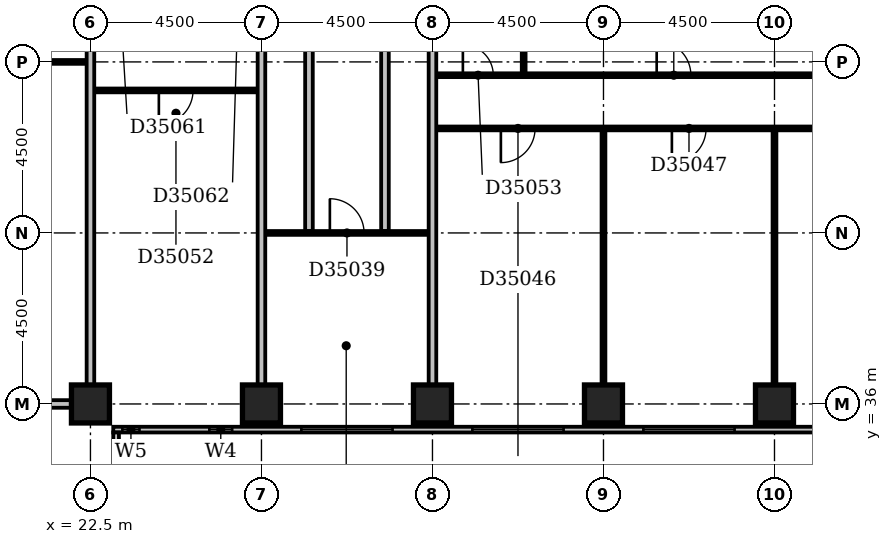
"""IFC4 building model, lengths in metres.
Left out: names, types, materials, properties, quantities, classifications, styles, units other than length and angle.
Written with IfcOpenShell. Run it as: python <this file> out.ifc"""

import sys

from ifc_helpers import new_model, si_unit, direction, frame, frame_2d, origin, origin_2d, place, context, subcontext, project, spatial, rectangle, extrude, element, fill, save


model = new_model("IFC4")
c1 = context("Model", 3, precision=1e-05, world=origin(), true_north=direction((0.0, 1.0)))
c2 = subcontext(c1, "Body", "Model", "MODEL_VIEW")
j1 = project(units=[si_unit("LENGTHUNIT", "METRE"), si_unit("PLANEANGLEUNIT", "RADIAN")], contexts=[c1])
p1 = place(None, origin())
s1 = spatial("IfcSite", under=j1, at=p1, CompositionType="ELEMENT")
p2 = place(p1, origin())
s2 = spatial("IfcBuilding", under=s1, at=p2, CompositionType="ELEMENT")
p3 = place(p2, frame((0.0, 0.0, 141.2)))
s3 = spatial("IfcBuildingStorey", under=s2, at=p3, CompositionType="ELEMENT", Elevation=141.2)
for number, where, z_axis, x_axis in (
    (1, (22.5, 36.0, -0.3), (0.0, 0.0, 1.0), (1.0, 0.0, 0.0)),
    (2, (27.0, 36.0, -0.3), (0.0, 0.0, 1.0), (1.0, 0.0, 0.0)),
    (3, (31.5, 36.0, -0.3), (0.0, 0.0, 1.0), (1.0, 0.0, 0.0)),
    (4, (36.0, 36.0, -0.3), (0.0, 0.0, 1.0), (1.0, 0.0, 0.0)),
    (5, (40.5, 36.0, -0.3), (0.0, 0.0, 1.0), (1.0, 0.0, 0.0)),
):
    element("IfcColumn", number, at=place(p3, frame(where, z_axis=z_axis, x_axis=x_axis)), inside=s3, PredefinedType="COLUMN", context=c2, shape_type="SweptSolid", body=[
        extrude(rectangle(XDim=1.0, YDim=1.0, at=origin_2d()), origin(), (0.0, 0.0, 1.0), 3.6),
    ])
p4 = place(p3, frame((23.175, 17.4, 0.0), z_axis=(0.0, 0.0, 1.0), x_axis=(0.0, 1.0, 0.0)))
e6 = element("IfcWall", 6, at=p4, inside=s3, PredefinedType="STANDARD", context=c2, shape_type="SweptSolid", body=[
    extrude(rectangle(XDim=17.85, YDim=0.15, at=frame_2d((8.925, 0.0))), origin(), (0.0, 0.0, 1.0), 2.7),
])
p5 = place(p4, frame((3.397, 0.0, 0.6)))
e7 = element("IfcOpeningElement", 7, at=p5, cuts=e6, PredefinedType="OPENING", context=c2, shape_type="SweptSolid", body=[
    extrude(rectangle(XDim=0.9, YDim=1.8, at=frame_2d((0.45, 0.9))), frame((0.0, 0.087, 0.0), z_axis=(0.0, -1.0, 0.0), x_axis=(1.0, 0.0, 0.0)), (0.0, 0.0, 1.0), 0.174),
])
p6 = place(p4, frame((6.15, 0.0, 0.6)))
e8 = element("IfcOpeningElement", 8, at=p6, cuts=e6, PredefinedType="OPENING", context=c2, shape_type="SweptSolid", body=[
    extrude(rectangle(XDim=2.4, YDim=1.8, at=frame_2d((1.2, 0.9))), frame((0.0, 0.087, 0.0), z_axis=(0.0, -1.0, 0.0), x_axis=(1.0, 0.0, 0.0)), (0.0, 0.0, 1.0), 0.174),
])
p7 = place(p4, frame((10.65, 0.0, 0.6)))
e9 = element("IfcOpeningElement", 9, at=p7, cuts=e6, PredefinedType="OPENING", context=c2, shape_type="SweptSolid", body=[
    extrude(rectangle(XDim=2.4, YDim=1.8, at=frame_2d((1.2, 0.9))), frame((0.0, 0.087, 0.0), z_axis=(0.0, -1.0, 0.0), x_axis=(1.0, 0.0, 0.0)), (0.0, 0.0, 1.0), 0.174),
])
p8 = place(p4, frame((15.15, 0.0, 0.6)))
e10 = element("IfcOpeningElement", 10, at=p8, cuts=e6, PredefinedType="OPENING", context=c2, shape_type="SweptSolid", body=[
    extrude(rectangle(XDim=2.4, YDim=1.8, at=frame_2d((1.2, 0.9))), frame((0.0, 0.087, 0.0), z_axis=(0.0, -1.0, 0.0), x_axis=(1.0, 0.0, 0.0)), (0.0, 0.0, 1.0), 0.174),
])
p9 = place(p3, frame((23.1, 35.325, 0.0), z_axis=(0.0, 0.0, 1.0), x_axis=(1.0, 0.0, 0.0)))
e11 = element("IfcWall", 11, at=p9, inside=s3, PredefinedType="STANDARD", context=c2, shape_type="SweptSolid", body=[
    extrude(rectangle(XDim=45.15, YDim=0.15, at=frame_2d((22.575, 0.0))), origin(), (0.0, 0.0, 1.0), 2.7),
])
p10 = place(p9, frame((0.24, 0.0, 0.6)))
e12 = element("IfcOpeningElement", 12, at=p10, cuts=e11, PredefinedType="OPENING", context=c2, shape_type="SweptSolid", body=[
    extrude(rectangle(XDim=0.45, YDim=1.8, at=frame_2d((0.225, 0.9))), frame((0.0, 0.087, 0.0), z_axis=(0.0, -1.0, 0.0), x_axis=(1.0, 0.0, 0.0)), (0.0, 0.0, 1.0), 0.174),
])
p11 = place(p9, frame((2.529, 0.0, 0.6)))
e13 = element("IfcOpeningElement", 13, at=p11, cuts=e11, PredefinedType="OPENING", context=c2, shape_type="SweptSolid", body=[
    extrude(rectangle(XDim=0.6, YDim=1.8, at=frame_2d((0.3, 0.9))), frame((0.0, 0.087, 0.0), z_axis=(0.0, -1.0, 0.0), x_axis=(1.0, 0.0, 0.0)), (0.0, 0.0, 1.0), 0.174),
])
p12 = place(p9, frame((4.95, 0.0, 0.6)))
e14 = element("IfcOpeningElement", 14, at=p12, cuts=e11, PredefinedType="OPENING", context=c2, shape_type="SweptSolid", body=[
    extrude(rectangle(XDim=2.4, YDim=1.8, at=frame_2d((1.2, 0.9))), frame((0.0, 0.087, 0.0), z_axis=(0.0, -1.0, 0.0), x_axis=(1.0, 0.0, 0.0)), (0.0, 0.0, 1.0), 0.174),
])
p13 = place(p9, frame((9.45, 0.0, 0.6)))
e15 = element("IfcOpeningElement", 15, at=p13, cuts=e11, PredefinedType="OPENING", context=c2, shape_type="SweptSolid", body=[
    extrude(rectangle(XDim=2.4, YDim=1.8, at=frame_2d((1.2, 0.9))), frame((0.0, 0.087, 0.0), z_axis=(0.0, -1.0, 0.0), x_axis=(1.0, 0.0, 0.0)), (0.0, 0.0, 1.0), 0.174),
])
p14 = place(p9, frame((13.95, 0.0, 0.6)))
e16 = element("IfcOpeningElement", 16, at=p14, cuts=e11, PredefinedType="OPENING", context=c2, shape_type="SweptSolid", body=[
    extrude(rectangle(XDim=2.4, YDim=1.8, at=frame_2d((1.2, 0.9))), frame((0.0, 0.087, 0.0), z_axis=(0.0, -1.0, 0.0), x_axis=(1.0, 0.0, 0.0)), (0.0, 0.0, 1.0), 0.174),
])
p15 = place(p9, frame((18.45, 0.0, 0.6)))
e17 = element("IfcOpeningElement", 17, at=p15, cuts=e11, PredefinedType="OPENING", context=c2, shape_type="SweptSolid", body=[
    extrude(rectangle(XDim=2.4, YDim=1.8, at=frame_2d((1.2, 0.9))), frame((0.0, 0.087, 0.0), z_axis=(0.0, -1.0, 0.0), x_axis=(1.0, 0.0, 0.0)), (0.0, 0.0, 1.0), 0.174),
])
p16 = place(p9, frame((22.653, 0.0, 0.6)))
e18 = element("IfcOpeningElement", 18, at=p16, cuts=e11, PredefinedType="OPENING", context=c2, shape_type="SweptSolid", body=[
    extrude(rectangle(XDim=1.5, YDim=1.8, at=frame_2d((0.75, 0.9))), frame((0.0, 0.087, 0.0), z_axis=(0.0, -1.0, 0.0), x_axis=(1.0, 0.0, 0.0)), (0.0, 0.0, 1.0), 0.174),
])
p17 = place(p9, frame((29.27, 0.0, 0.6)))
e19 = element("IfcOpeningElement", 19, at=p17, cuts=e11, PredefinedType="OPENING", context=c2, shape_type="SweptSolid", body=[
    extrude(rectangle(XDim=0.9, YDim=1.8, at=frame_2d((0.45, 0.9))), frame((0.0, 0.087, 0.0), z_axis=(0.0, -1.0, 0.0), x_axis=(1.0, 0.0, 0.0)), (0.0, 0.0, 1.0), 0.174),
])
p18 = place(p9, frame((31.95, 0.0, 0.6)))
e20 = element("IfcOpeningElement", 20, at=p18, cuts=e11, PredefinedType="OPENING", context=c2, shape_type="SweptSolid", body=[
    extrude(rectangle(XDim=2.4, YDim=1.8, at=frame_2d((1.2, 0.9))), frame((0.0, 0.087, 0.0), z_axis=(0.0, -1.0, 0.0), x_axis=(1.0, 0.0, 0.0)), (0.0, 0.0, 1.0), 0.174),
])
p19 = place(p9, frame((36.45, 0.0, 0.6)))
e21 = element("IfcOpeningElement", 21, at=p19, cuts=e11, PredefinedType="OPENING", context=c2, shape_type="SweptSolid", body=[
    extrude(rectangle(XDim=2.4, YDim=1.8, at=frame_2d((1.2, 0.9))), frame((0.0, 0.087, 0.0), z_axis=(0.0, -1.0, 0.0), x_axis=(1.0, 0.0, 0.0)), (0.0, 0.0, 1.0), 0.174),
])
p20 = place(p9, frame((40.95, 0.0, 0.6)))
e22 = element("IfcOpeningElement", 22, at=p20, cuts=e11, PredefinedType="OPENING", context=c2, shape_type="SweptSolid", body=[
    extrude(rectangle(XDim=2.4, YDim=1.8, at=frame_2d((1.2, 0.9))), frame((0.0, 0.087, 0.0), z_axis=(0.0, -1.0, 0.0), x_axis=(1.0, 0.0, 0.0)), (0.0, 0.0, 1.0), 0.174),
])
for number, where, z_axis, x_axis in (
    (23, (9.1, 36.0, 0.0), (0.0, 0.0, 1.0), (1.0, 0.0, 0.0)),
    (24, (22.5, 36.5, 0.0), (0.0, 0.0, 1.0), (0.0, 1.0, 0.0)),
):
    element("IfcWall", number, at=place(p3, frame(where, z_axis=z_axis, x_axis=x_axis)), inside=s3, PredefinedType="PARTITIONING", context=c2, shape_type="SweptSolid", body=[
        extrude(rectangle(XDim=12.9, YDim=0.2, at=frame_2d((6.45, 0.0))), origin(), (0.0, 0.0, 1.0), 3.3),
    ])
p21 = place(p3, frame((27.0, 36.5, 0.0), z_axis=(0.0, 0.0, 1.0), x_axis=(0.0, 1.0, 0.0)))
e25 = element("IfcWall", 25, at=p21, inside=s3, PredefinedType="PARTITIONING", context=c2, shape_type="SweptSolid", body=[
    extrude(rectangle(XDim=12.9, YDim=0.2, at=frame_2d((6.45, 0.0))), origin(), (0.0, 0.0, 1.0), 2.6),
])
p22 = place(p3, frame((31.5, 36.5, 0.0), z_axis=(0.0, 0.0, 1.0), x_axis=(0.0, 1.0, 0.0)))
e26 = element("IfcWall", 26, at=p22, inside=s3, PredefinedType="PARTITIONING", context=c2, shape_type="SweptSolid", body=[
    extrude(rectangle(XDim=12.9, YDim=0.2, at=frame_2d((6.45, 0.0))), origin(), (0.0, 0.0, 1.0), 3.3),
])
p23 = place(p3, frame((36.0, 36.5, 0.0), z_axis=(0.0, 0.0, 1.0), x_axis=(0.0, 1.0, 0.0)))
e27 = element("IfcWall", 27, at=p23, inside=s3, PredefinedType="PARTITIONING", context=c2, shape_type="SweptSolid", body=[
    extrude(rectangle(XDim=6.7, YDim=0.1, at=frame_2d((3.35, 0.0))), origin(), (0.0, 0.0, 1.0), 2.4),
])
p24 = place(p3, frame((40.5, 36.5, 0.0), z_axis=(0.0, 0.0, 1.0), x_axis=(0.0, 1.0, 0.0)))
e28 = element("IfcWall", 28, at=p24, inside=s3, PredefinedType="PARTITIONING", context=c2, shape_type="SweptSolid", body=[
    extrude(rectangle(XDim=6.7, YDim=0.1, at=frame_2d((3.35, 0.0))), origin(), (0.0, 0.0, 1.0), 3.3),
])
p25 = place(p3, frame((27.1, 40.5, 0.0), z_axis=(0.0, 0.0, 1.0), x_axis=(1.0, 0.0, 0.0)))
e29 = element("IfcWall", 29, at=p25, inside=s3, PredefinedType="PARTITIONING", context=c2, shape_type="SweptSolid", body=[
    extrude(rectangle(XDim=4.3, YDim=0.1, at=frame_2d((2.15, 0.0))), origin(), (0.0, 0.0, 1.0), 3.3),
])
p26 = place(p25, frame((1.7, 0.0, 0.0)))
e30 = element("IfcOpeningElement", 30, at=p26, cuts=e29, PredefinedType="OPENING", context=c2, shape_type="SweptSolid", body=[
    extrude(rectangle(XDim=0.9, YDim=2.1, at=frame_2d((0.45, 1.05))), frame((0.0, 0.062, 0.0), z_axis=(0.0, -1.0, 0.0), x_axis=(1.0, 0.0, 0.0)), (0.0, 0.0, 1.0), 0.124),
])
p27 = place(p3, frame((28.25, 40.55, 0.0), z_axis=(0.0, 0.0, 1.0), x_axis=(0.0, 1.0, 0.0)))
e31 = element("IfcWall", 31, at=p27, inside=s3, PredefinedType="PARTITIONING", context=c2, shape_type="SweptSolid", body=[
    extrude(rectangle(XDim=8.95, YDim=0.2, at=frame_2d((4.475, 0.0))), origin(), (0.0, 0.0, 1.0), 3.3),
])
p28 = place(p27, frame((5.55, 0.0, 0.0)))
e32 = element("IfcOpeningElement", 32, at=p28, cuts=e31, PredefinedType="OPENING", context=c2, shape_type="SweptSolid", body=[
    extrude(rectangle(XDim=0.8, YDim=2.1, at=frame_2d((0.4, 1.05))), frame((0.0, 0.112, 0.0), z_axis=(0.0, -1.0, 0.0), x_axis=(1.0, 0.0, 0.0)), (0.0, 0.0, 1.0), 0.224),
])
p29 = place(p3, frame((30.25, 40.55, 0.0), z_axis=(0.0, 0.0, 1.0), x_axis=(0.0, 1.0, 0.0)))
e33 = element("IfcWall", 33, at=p29, inside=s3, PredefinedType="PARTITIONING", context=c2, shape_type="SweptSolid", body=[
    extrude(rectangle(XDim=8.95, YDim=0.2, at=frame_2d((4.475, 0.0))), origin(), (0.0, 0.0, 1.0), 3.3),
])
p30 = place(p29, frame((5.55, 0.0, 0.0)))
e34 = element("IfcOpeningElement", 34, at=p30, cuts=e33, PredefinedType="OPENING", context=c2, shape_type="SweptSolid", body=[
    extrude(rectangle(XDim=0.8, YDim=2.1, at=frame_2d((0.4, 1.05))), frame((0.0, 0.112, 0.0), z_axis=(0.0, -1.0, 0.0), x_axis=(1.0, 0.0, 0.0)), (0.0, 0.0, 1.0), 0.224),
])
p31 = place(p3, frame((31.6, 43.25, 0.0), z_axis=(0.0, 0.0, 1.0), x_axis=(1.0, 0.0, 0.0)))
e35 = element("IfcWall", 35, at=p31, inside=s3, PredefinedType="PARTITIONING", context=c2, shape_type="SweptSolid", body=[
    extrude(rectangle(XDim=13.3, YDim=0.1, at=frame_2d((6.65, 0.0))), origin(), (0.0, 0.0, 1.0), 3.3),
])
p32 = place(p31, frame((1.7, 0.0, 0.0)))
e36 = element("IfcOpeningElement", 36, at=p32, cuts=e35, PredefinedType="OPENING", context=c2, shape_type="SweptSolid", body=[
    extrude(rectangle(XDim=0.9, YDim=2.1, at=frame_2d((0.45, 1.05))), frame((0.0, 0.062, 0.0), z_axis=(0.0, -1.0, 0.0), x_axis=(1.0, 0.0, 0.0)), (0.0, 0.0, 1.0), 0.124),
])
p33 = place(p31, frame((6.2, 0.0, 0.0)))
e37 = element("IfcOpeningElement", 37, at=p33, cuts=e35, PredefinedType="OPENING", context=c2, shape_type="SweptSolid", body=[
    extrude(rectangle(XDim=0.9, YDim=2.1, at=frame_2d((0.45, 1.05))), frame((0.0, 0.062, 0.0), z_axis=(0.0, -1.0, 0.0), x_axis=(1.0, 0.0, 0.0)), (0.0, 0.0, 1.0), 0.124),
])
p34 = place(p31, frame((10.7, 0.0, 0.0)))
e38 = element("IfcOpeningElement", 38, at=p34, cuts=e35, PredefinedType="OPENING", context=c2, shape_type="SweptSolid", body=[
    extrude(rectangle(XDim=0.9, YDim=2.1, at=frame_2d((0.45, 1.05))), frame((0.0, 0.062, 0.0), z_axis=(0.0, -1.0, 0.0), x_axis=(1.0, 0.0, 0.0)), (0.0, 0.0, 1.0), 0.124),
])
p35 = place(p3, frame((22.6, 44.25, 0.0), z_axis=(0.0, 0.0, 1.0), x_axis=(1.0, 0.0, 0.0)))
e39 = element("IfcWall", 39, at=p35, inside=s3, PredefinedType="PARTITIONING", context=c2, shape_type="SweptSolid", body=[
    extrude(rectangle(XDim=4.3, YDim=0.1, at=frame_2d((2.15, 0.0))), origin(), (0.0, 0.0, 1.0), 3.3),
])
p36 = place(p35, frame((1.7, 0.0, 0.0)))
e40 = element("IfcOpeningElement", 40, at=p36, cuts=e39, PredefinedType="OPENING", context=c2, shape_type="SweptSolid", body=[
    extrude(rectangle(XDim=0.9, YDim=2.1, at=frame_2d((0.45, 1.05))), frame((0.0, 0.062, 0.0), z_axis=(0.0, -1.0, 0.0), x_axis=(1.0, 0.0, 0.0)), (0.0, 0.0, 1.0), 0.124),
])
p37 = place(p3, frame((31.6, 44.65, 0.0), z_axis=(0.0, 0.0, 1.0), x_axis=(1.0, 0.0, 0.0)))
e41 = element("IfcWall", 41, at=p37, inside=s3, PredefinedType="PARTITIONING", context=c2, shape_type="SweptSolid", body=[
    extrude(rectangle(XDim=10.15, YDim=0.1, at=frame_2d((5.075, 0.0))), origin(), (0.0, 0.0, 1.0), 3.3),
])
p38 = place(p37, frame((0.7, 0.0, 0.0)))
e42 = element("IfcOpeningElement", 42, at=p38, cuts=e41, PredefinedType="OPENING", context=c2, shape_type="SweptSolid", body=[
    extrude(rectangle(XDim=0.8, YDim=2.1, at=frame_2d((0.4, 1.05))), frame((0.0, 0.062, 0.0), z_axis=(0.0, -1.0, 0.0), x_axis=(1.0, 0.0, 0.0)), (0.0, 0.0, 1.0), 0.124),
])
p39 = place(p37, frame((5.8, 0.0, 0.0)))
e43 = element("IfcOpeningElement", 43, at=p39, cuts=e41, PredefinedType="OPENING", context=c2, shape_type="SweptSolid", body=[
    extrude(rectangle(XDim=0.9, YDim=2.1, at=frame_2d((0.45, 1.05))), frame((0.0, 0.062, 0.0), z_axis=(0.0, -1.0, 0.0), x_axis=(1.0, 0.0, 0.0)), (0.0, 0.0, 1.0), 0.124),
])
p40 = place(p3, frame((33.9, 44.7, 0.0), z_axis=(0.0, 0.0, 1.0), x_axis=(0.0, 1.0, 0.0)))
e44 = element("IfcWall", 44, at=p40, inside=s3, PredefinedType="PLUMBINGWALL", context=c2, shape_type="SweptSolid", body=[
    extrude(rectangle(XDim=4.7, YDim=0.1, at=frame_2d((2.35, 0.0))), origin(), (0.0, 0.0, 1.0), 3.3),
])
p41 = place(p3, frame((9.1, 45.0, 0.0), z_axis=(0.0, 0.0, 1.0), x_axis=(1.0, 0.0, 0.0)))
e45 = element("IfcWall", 45, at=p41, inside=s3, PredefinedType="PARTITIONING", context=c2, shape_type="SweptSolid", body=[
    extrude(rectangle(XDim=13.3, YDim=0.1, at=frame_2d((6.65, 0.0))), origin(), (0.0, 0.0, 1.0), 3.3),
])
p42 = place(p8, origin())
e46 = element("IfcWindow", 46, at=p42, inside=s3, PartitioningType="SINGLE_PANEL", PredefinedType="WINDOW", context=c2, shape_type="SweptSolid", body=[
    extrude(rectangle(XDim=2.4, YDim=1.8, at=frame_2d((1.2, 0.9))), frame((0.0, 0.03, 0.0), z_axis=(0.0, -1.0, 0.0), x_axis=(1.0, 0.0, 0.0)), (0.0, 0.0, 1.0), 0.06),
])
fill(e10, e46)
p43 = place(p10, origin())
e47 = element("IfcWindow", 47, at=p43, inside=s3, PartitioningType="SINGLE_PANEL", PredefinedType="WINDOW", context=c2, shape_type="SweptSolid", body=[
    extrude(rectangle(XDim=0.45, YDim=1.8, at=frame_2d((0.225, 0.9))), frame((0.0, 0.03, 0.0), z_axis=(0.0, -1.0, 0.0), x_axis=(1.0, 0.0, 0.0)), (0.0, 0.0, 1.0), 0.06),
])
fill(e12, e47)
p44 = place(p11, origin())
e48 = element("IfcWindow", 48, at=p44, inside=s3, PartitioningType="SINGLE_PANEL", PredefinedType="WINDOW", context=c2, shape_type="SweptSolid", body=[
    extrude(rectangle(XDim=0.6, YDim=1.8, at=frame_2d((0.3, 0.9))), frame((0.0, 0.03, 0.0), z_axis=(0.0, -1.0, 0.0), x_axis=(1.0, 0.0, 0.0)), (0.0, 0.0, 1.0), 0.06),
])
fill(e13, e48)
p45 = place(p12, origin())
e49 = element("IfcWindow", 49, at=p45, inside=s3, PartitioningType="SINGLE_PANEL", PredefinedType="WINDOW", context=c2, shape_type="SweptSolid", body=[
    extrude(rectangle(XDim=2.4, YDim=1.8, at=frame_2d((1.2, 0.9))), frame((0.0, 0.03, 0.0), z_axis=(0.0, -1.0, 0.0), x_axis=(1.0, 0.0, 0.0)), (0.0, 0.0, 1.0), 0.06),
])
fill(e14, e49)
p46 = place(p13, origin())
e50 = element("IfcWindow", 50, at=p46, inside=s3, PartitioningType="SINGLE_PANEL", PredefinedType="WINDOW", context=c2, shape_type="SweptSolid", body=[
    extrude(rectangle(XDim=2.4, YDim=1.8, at=frame_2d((1.2, 0.9))), frame((0.0, 0.03, 0.0), z_axis=(0.0, -1.0, 0.0), x_axis=(1.0, 0.0, 0.0)), (0.0, 0.0, 1.0), 0.06),
])
fill(e15, e50)
p47 = place(p14, origin())
e51 = element("IfcWindow", 51, at=p47, inside=s3, PartitioningType="SINGLE_PANEL", PredefinedType="WINDOW", context=c2, shape_type="SweptSolid", body=[
    extrude(rectangle(XDim=2.4, YDim=1.8, at=frame_2d((1.2, 0.9))), frame((0.0, 0.03, 0.0), z_axis=(0.0, -1.0, 0.0), x_axis=(1.0, 0.0, 0.0)), (0.0, 0.0, 1.0), 0.06),
])
fill(e16, e51)
p48 = place(p26, origin())
e52 = element("IfcDoor", 52, at=p48, inside=s3, OperationType="SINGLE_SWING_LEFT", PredefinedType="DOOR", context=c2, shape_type="SweptSolid", body=[
    extrude(rectangle(XDim=0.9, YDim=2.1, at=frame_2d((0.45, 1.05))), frame((0.0, 0.025, 0.0), z_axis=(0.0, -1.0, 0.0), x_axis=(1.0, 0.0, 0.0)), (0.0, 0.0, 1.0), 0.05),
])
fill(e30, e52)
p49 = place(p32, frame((0.9, 0.0, 0.0), z_axis=(0.0, 0.0, 1.0), x_axis=(-1.0, 0.0, 0.0)))
e53 = element("IfcDoor", 53, at=p49, inside=s3, OperationType="SINGLE_SWING_RIGHT", PredefinedType="DOOR", context=c2, shape_type="SweptSolid", body=[
    extrude(rectangle(XDim=0.9, YDim=2.1, at=frame_2d((0.45, 1.05))), frame((0.0, 0.025, 0.0), z_axis=(0.0, -1.0, 0.0), x_axis=(1.0, 0.0, 0.0)), (0.0, 0.0, 1.0), 0.05),
])
fill(e36, e53)
p50 = place(p33, frame((0.9, 0.0, 0.0), z_axis=(0.0, 0.0, 1.0), x_axis=(-1.0, 0.0, 0.0)))
e54 = element("IfcDoor", 54, at=p50, inside=s3, OperationType="SINGLE_SWING_RIGHT", PredefinedType="DOOR", context=c2, shape_type="SweptSolid", body=[
    extrude(rectangle(XDim=0.9, YDim=2.1, at=frame_2d((0.45, 1.05))), frame((0.0, 0.025, 0.0), z_axis=(0.0, -1.0, 0.0), x_axis=(1.0, 0.0, 0.0)), (0.0, 0.0, 1.0), 0.05),
])
fill(e37, e54)
p51 = place(p36, frame((0.9, 0.0, 0.0), z_axis=(0.0, 0.0, 1.0), x_axis=(-1.0, 0.0, 0.0)))
e55 = element("IfcDoor", 55, at=p51, inside=s3, OperationType="SINGLE_SWING_RIGHT", PredefinedType="DOOR", context=c2, shape_type="SweptSolid", body=[
    extrude(rectangle(XDim=0.9, YDim=2.1, at=frame_2d((0.45, 1.05))), frame((0.0, 0.025, 0.0), z_axis=(0.0, -1.0, 0.0), x_axis=(1.0, 0.0, 0.0)), (0.0, 0.0, 1.0), 0.05),
])
fill(e40, e55)
p52 = place(p38, origin())
e56 = element("IfcDoor", 56, at=p52, inside=s3, OperationType="SINGLE_SWING_LEFT", PredefinedType="DOOR", context=c2, shape_type="SweptSolid", body=[
    extrude(rectangle(XDim=0.8, YDim=2.1, at=frame_2d((0.4, 1.05))), frame((0.0, 0.025, 0.0), z_axis=(0.0, -1.0, 0.0), x_axis=(1.0, 0.0, 0.0)), (0.0, 0.0, 1.0), 0.05),
])
fill(e42, e56)
p53 = place(p39, origin())
e57 = element("IfcDoor", 57, at=p53, inside=s3, OperationType="SINGLE_SWING_LEFT", PredefinedType="DOOR", context=c2, shape_type="SweptSolid", body=[
    extrude(rectangle(XDim=0.9, YDim=2.1, at=frame_2d((0.45, 1.05))), frame((0.0, 0.025, 0.0), z_axis=(0.0, -1.0, 0.0), x_axis=(1.0, 0.0, 0.0)), (0.0, 0.0, 1.0), 0.05),
])
fill(e43, e57)
save(model, sys.argv[1])
